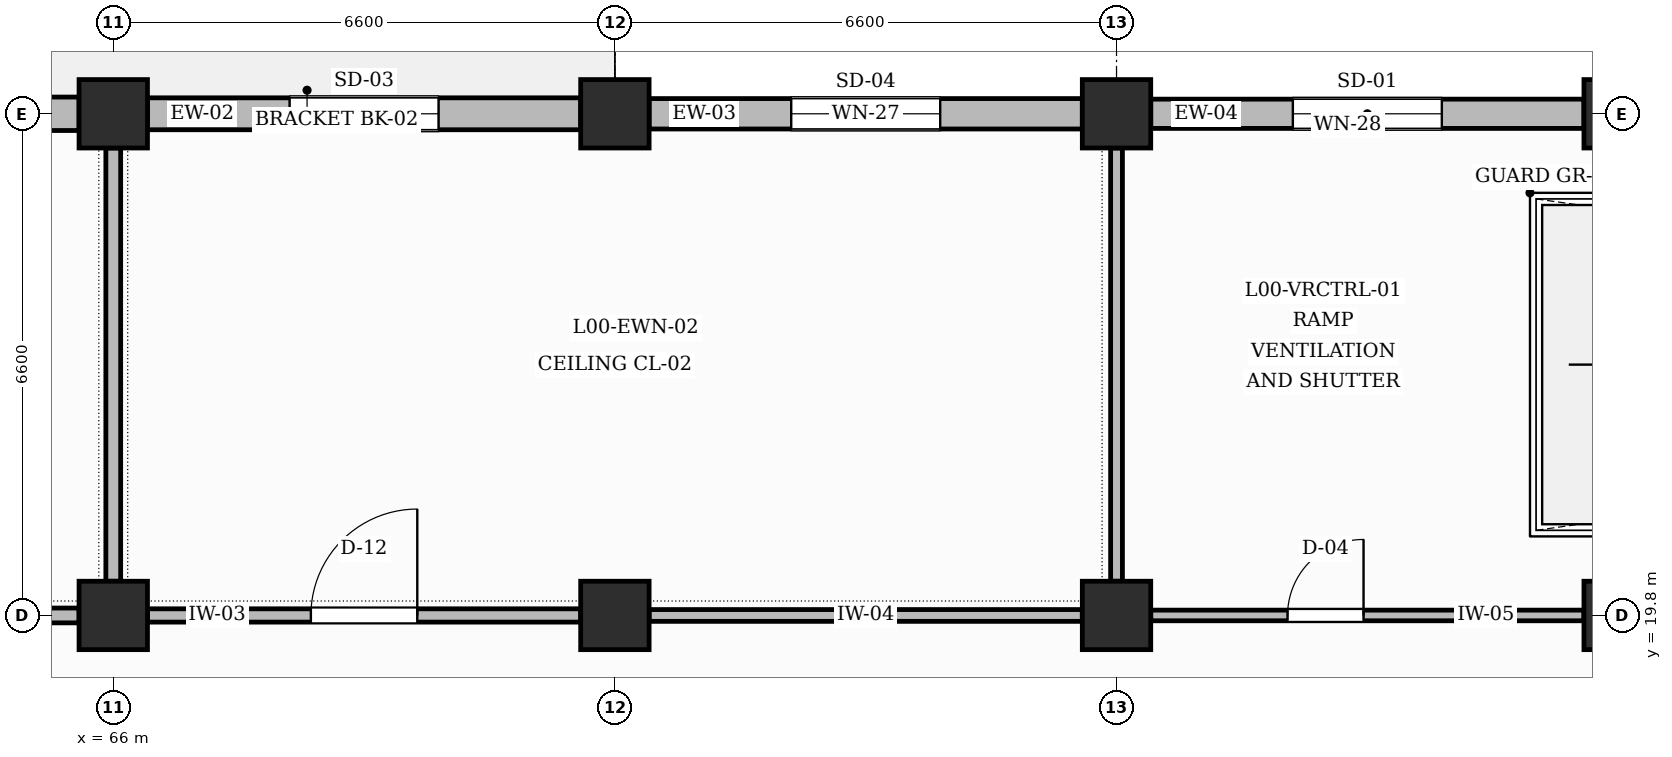
"""IFC4 building model, lengths in metres.
Left out: names, types, materials, properties, quantities, classifications, styles, units other than length and angle.
Written with IfcOpenShell. Run it as: python <this file> out.ifc"""

import sys

from ifc_helpers import new_model, si_unit, direction, frame, frame_2d, origin, origin_2d, place, context, subcontext, project, spatial, rectangle, extrude, element, fill, save


model = new_model("IFC4")
c1 = context("Model", 3, precision=1e-05, world=origin(), true_north=direction((0.0, 1.0)))
c2 = subcontext(c1, "Body", "Model", "MODEL_VIEW")
j1 = project(units=[si_unit("LENGTHUNIT", "METRE"), si_unit("PLANEANGLEUNIT", "RADIAN")], contexts=[c1])
p1 = place(None, origin())
s1 = spatial("IfcSite", under=j1, at=p1, CompositionType="ELEMENT")
p2 = place(p1, origin())
s2 = spatial("IfcBuilding", under=s1, at=p2, CompositionType="ELEMENT")
p3 = place(p2, origin())
s3 = spatial("IfcBuildingStorey", under=s2, at=p3, CompositionType="ELEMENT", Elevation=0.0)
for number, where, z_axis, x_axis in (
    (1, (66.0, 19.8, 0.0), (0.0, 0.0, 1.0), (1.0, 0.0, 0.0)),
    (2, (66.0, 26.4, 0.0), (0.0, 0.0, 1.0), (1.0, 0.0, 0.0)),
    (3, (72.6, 19.8, 0.0), (0.0, 0.0, 1.0), (1.0, 0.0, 0.0)),
    (4, (72.6, 26.4, 0.0), (0.0, 0.0, 1.0), (1.0, 0.0, 0.0)),
    (5, (79.2, 19.8, 0.0), (0.0, 0.0, 1.0), (1.0, 0.0, 0.0)),
    (6, (79.2, 26.4, 0.0), (0.0, 0.0, 1.0), (1.0, 0.0, 0.0)),
    (7, (85.8, 19.8, 0.0), (0.0, 0.0, 1.0), (1.0, 0.0, 0.0)),
    (8, (85.8, 26.4, 0.0), (0.0, 0.0, 1.0), (1.0, 0.0, 0.0)),
):
    element("IfcColumn", number, at=place(p3, frame(where, z_axis=z_axis, x_axis=x_axis)), inside=s3, PredefinedType="COLUMN", context=c2, shape_type="SweptSolid", body=[
        extrude(rectangle(XDim=0.9, YDim=0.9, at=origin_2d()), origin(), (0.0, 0.0, 1.0), 5.4),
    ])
p4 = place(p3, frame((59.85, 26.4, 0.0), z_axis=(0.0, 0.0, 1.0), x_axis=(1.0, 0.0, 0.0)))
e9 = element("IfcWall", 9, at=p4, inside=s3, PredefinedType="SOLIDWALL", context=c2, shape_type="SweptSolid", body=[
    extrude(rectangle(XDim=5.7, YDim=0.44, at=frame_2d((2.85, 0.0))), origin(), (0.0, 0.0, 1.0), 4.45),
])
p5 = place(p4, frame((2.025, 0.0, 0.0)))
e10 = element("IfcOpeningElement", 10, at=p5, cuts=e9, PredefinedType="OPENING", context=c2, shape_type="SweptSolid", body=[
    extrude(rectangle(XDim=1.65, YDim=2.35, at=frame_2d((0.825, 1.175))), frame((0.0, 0.23, 0.0), z_axis=(0.0, -1.0, 0.0), x_axis=(1.0, 0.0, 0.0)), (0.0, 0.0, 1.0), 0.46),
])
p6 = place(p3, frame((66.45, 26.4, 0.0), z_axis=(0.0, 0.0, 1.0), x_axis=(1.0, 0.0, 0.0)))
e11 = element("IfcWall", 11, at=p6, inside=s3, PredefinedType="SOLIDWALL", context=c2, shape_type="SweptSolid", body=[
    extrude(rectangle(XDim=5.7, YDim=0.42, at=frame_2d((2.85, 0.0))), origin(), (0.0, 0.0, 1.0), 4.45),
])
p7 = place(p6, frame((1.87, 0.0, 0.95)))
e12 = element("IfcOpeningElement", 12, at=p7, cuts=e11, PredefinedType="OPENING", context=c2, shape_type="SweptSolid", body=[
    extrude(rectangle(XDim=1.96, YDim=1.52, at=frame_2d((0.98, 0.76))), frame((0.0, 0.22, 0.0), z_axis=(0.0, -1.0, 0.0), x_axis=(1.0, 0.0, 0.0)), (0.0, 0.0, 1.0), 0.44),
])
p8 = place(p3, frame((73.05, 26.4, 0.0), z_axis=(0.0, 0.0, 1.0), x_axis=(1.0, 0.0, 0.0)))
e13 = element("IfcWall", 13, at=p8, inside=s3, PredefinedType="SOLIDWALL", context=c2, shape_type="SweptSolid", body=[
    extrude(rectangle(XDim=5.7, YDim=0.4, at=frame_2d((2.85, 0.0))), origin(), (0.0, 0.0, 1.0), 4.45),
])
p9 = place(p8, frame((1.87, 0.0, 0.95)))
e14 = element("IfcOpeningElement", 14, at=p9, cuts=e13, PredefinedType="OPENING", context=c2, shape_type="SweptSolid", body=[
    extrude(rectangle(XDim=1.96, YDim=1.74, at=frame_2d((0.98, 0.87))), frame((0.0, 0.21, 0.0), z_axis=(0.0, -1.0, 0.0), x_axis=(1.0, 0.0, 0.0)), (0.0, 0.0, 1.0), 0.42),
])
p10 = place(p3, frame((79.65, 26.4, 0.0), z_axis=(0.0, 0.0, 1.0), x_axis=(1.0, 0.0, 0.0)))
e15 = element("IfcWall", 15, at=p10, inside=s3, PredefinedType="SOLIDWALL", context=c2, shape_type="SweptSolid", body=[
    extrude(rectangle(XDim=5.7, YDim=0.385, at=frame_2d((2.85, 0.0))), origin(), (0.0, 0.0, 1.0), 4.45),
])
p11 = place(p10, frame((1.87, 0.0, 0.95)))
e16 = element("IfcOpeningElement", 16, at=p11, cuts=e15, PredefinedType="OPENING", context=c2, shape_type="SweptSolid", body=[
    extrude(rectangle(XDim=1.96, YDim=1.96, at=frame_2d((0.98, 0.98))), frame((0.0, 0.202, 0.0), z_axis=(0.0, -1.0, 0.0), x_axis=(1.0, 0.0, 0.0)), (0.0, 0.0, 1.0), 0.405),
])
p12 = place(p3, frame((59.85, 19.8, 0.0), z_axis=(0.0, 0.0, 1.0), x_axis=(1.0, 0.0, 0.0)))
e17 = element("IfcWall", 17, at=p12, inside=s3, PredefinedType="PARTITIONING", context=c2, shape_type="SweptSolid", body=[
    extrude(rectangle(XDim=5.7, YDim=0.195, at=frame_2d((2.85, 0.0))), origin(), (0.0, 0.0, 1.0), 4.2),
])
p13 = place(p3, frame((66.0, 20.25, 0.0), z_axis=(0.0, 0.0, 1.0), x_axis=(0.0, 1.0, 0.0)))
e18 = element("IfcWall", 18, at=p13, inside=s3, PredefinedType="PARTITIONING", context=c2, shape_type="SweptSolid", body=[
    extrude(rectangle(XDim=5.7, YDim=0.195, at=frame_2d((2.85, 0.0))), origin(), (0.0, 0.0, 1.0), 4.3),
])
p14 = place(p3, frame((66.45, 19.8, 0.0), z_axis=(0.0, 0.0, 1.0), x_axis=(1.0, 0.0, 0.0)))
e19 = element("IfcWall", 19, at=p14, inside=s3, PredefinedType="PARTITIONING", context=c2, shape_type="SweptSolid", body=[
    extrude(rectangle(XDim=5.7, YDim=0.175, at=frame_2d((2.85, 0.0))), origin(), (0.0, 0.0, 1.0), 4.3),
])
p15 = place(p14, frame((2.15, 0.0, 0.0)))
e20 = element("IfcOpeningElement", 20, at=p15, cuts=e19, PredefinedType="OPENING", context=c2, shape_type="SweptSolid", body=[
    extrude(rectangle(XDim=1.4, YDim=2.25, at=frame_2d((0.7, 1.125))), frame((0.0, 0.097, 0.0), z_axis=(0.0, -1.0, 0.0), x_axis=(1.0, 0.0, 0.0)), (0.0, 0.0, 1.0), 0.195),
])
p16 = place(p3, frame((73.05, 19.8, 0.0), z_axis=(0.0, 0.0, 1.0), x_axis=(1.0, 0.0, 0.0)))
e21 = element("IfcWall", 21, at=p16, inside=s3, PredefinedType="PARTITIONING", context=c2, shape_type="SweptSolid", body=[
    extrude(rectangle(XDim=5.7, YDim=0.155, at=frame_2d((2.85, 0.0))), origin(), (0.0, 0.0, 1.0), 4.2),
])
p17 = place(p3, frame((79.2, 20.25, 0.0), z_axis=(0.0, 0.0, 1.0), x_axis=(0.0, 1.0, 0.0)))
e22 = element("IfcWall", 22, at=p17, inside=s3, PredefinedType="PARTITIONING", context=c2, shape_type="SweptSolid", body=[
    extrude(rectangle(XDim=5.7, YDim=0.155, at=frame_2d((2.85, 0.0))), origin(), (0.0, 0.0, 1.0), 4.3),
])
p18 = place(p3, frame((79.65, 19.8, 0.0), z_axis=(0.0, 0.0, 1.0), x_axis=(1.0, 0.0, 0.0)))
e23 = element("IfcWall", 23, at=p18, inside=s3, PredefinedType="PARTITIONING", context=c2, shape_type="SweptSolid", body=[
    extrude(rectangle(XDim=5.7, YDim=0.14, at=frame_2d((2.85, 0.0))), origin(), (0.0, 0.0, 1.0), 4.3),
])
p19 = place(p18, frame((1.8, 0.0, 0.0)))
e24 = element("IfcOpeningElement", 24, at=p19, cuts=e23, PredefinedType="OPENING", context=c2, shape_type="SweptSolid", body=[
    extrude(rectangle(XDim=1.0, YDim=2.1, at=frame_2d((0.5, 1.05))), frame((0.0, 0.08, 0.0), z_axis=(0.0, -1.0, 0.0), x_axis=(1.0, 0.0, 0.0)), (0.0, 0.0, 1.0), 0.16),
])
p20 = place(p7, origin())
e25 = element("IfcWindow", 25, at=p20, inside=s3, PartitioningType="DOUBLE_PANEL_VERTICAL", PredefinedType="WINDOW", context=c2, shape_type="SweptSolid", body=[
    extrude(rectangle(XDim=1.96, YDim=1.52, at=frame_2d((0.98, 0.76))), frame((0.0, 0.03, 0.0), z_axis=(0.0, -1.0, 0.0), x_axis=(1.0, 0.0, 0.0)), (0.0, 0.0, 1.0), 0.06),
])
fill(e12, e25)
p21 = place(p9, origin())
e26 = element("IfcWindow", 26, at=p21, inside=s3, PartitioningType="DOUBLE_PANEL_VERTICAL", PredefinedType="WINDOW", context=c2, shape_type="SweptSolid", body=[
    extrude(rectangle(XDim=1.96, YDim=1.74, at=frame_2d((0.98, 0.87))), frame((0.0, 0.03, 0.0), z_axis=(0.0, -1.0, 0.0), x_axis=(1.0, 0.0, 0.0)), (0.0, 0.0, 1.0), 0.06),
])
fill(e14, e26)
p22 = place(p11, origin())
e27 = element("IfcWindow", 27, at=p22, inside=s3, PartitioningType="DOUBLE_PANEL_VERTICAL", PredefinedType="WINDOW", context=c2, shape_type="SweptSolid", body=[
    extrude(rectangle(XDim=1.96, YDim=1.96, at=frame_2d((0.98, 0.98))), frame((0.0, 0.03, 0.0), z_axis=(0.0, -1.0, 0.0), x_axis=(1.0, 0.0, 0.0)), (0.0, 0.0, 1.0), 0.06),
])
fill(e16, e27)
p23 = place(p19, origin())
e28 = element("IfcDoor", 28, at=p23, inside=s3, OperationType="SINGLE_SWING_RIGHT", PredefinedType="DOOR", context=c2, shape_type="SweptSolid", body=[
    extrude(rectangle(XDim=1.0, YDim=2.1, at=frame_2d((0.5, 1.05))), frame((0.0, 0.025, 0.0), z_axis=(0.0, -1.0, 0.0), x_axis=(1.0, 0.0, 0.0)), (0.0, 0.0, 1.0), 0.05),
])
fill(e24, e28)
p24 = place(p15, origin())
e29 = element("IfcDoor", 29, at=p24, inside=s3, OperationType="SINGLE_SWING_RIGHT", PredefinedType="DOOR", context=c2, shape_type="SweptSolid", body=[
    extrude(rectangle(XDim=1.4, YDim=2.25, at=frame_2d((0.7, 1.125))), frame((0.0, 0.025, 0.0), z_axis=(0.0, -1.0, 0.0), x_axis=(1.0, 0.0, 0.0)), (0.0, 0.0, 1.0), 0.05),
])
fill(e20, e29)
save(model, sys.argv[1])
